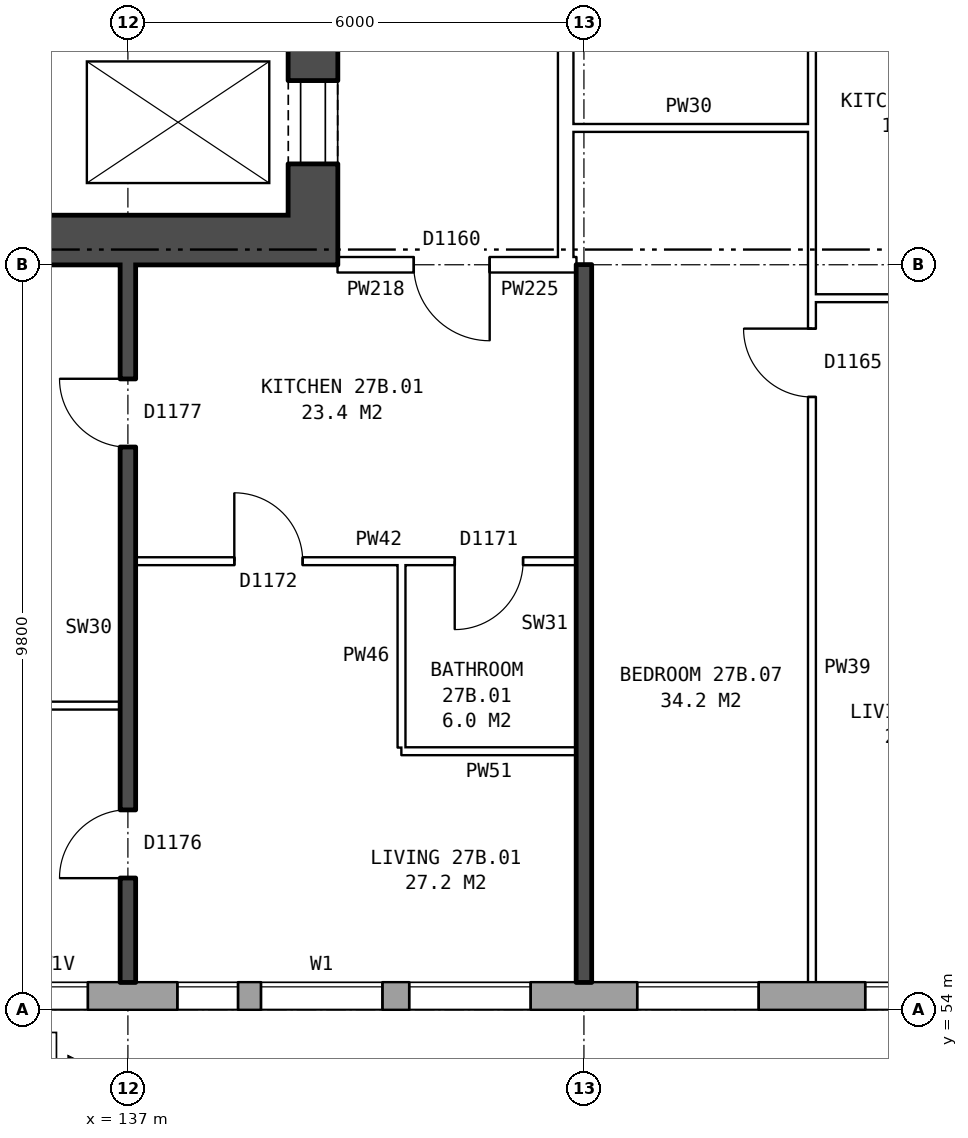
"""IFC4 building model, lengths in metres.
Left out: names, types, materials, properties, quantities, classifications, styles, units other than length and angle.
Written with IfcOpenShell. Run it as: python <this file> out.ifc"""

import sys

from ifc_helpers import new_model, si_unit, direction, frame, frame_2d, origin, place, context, subcontext, project, spatial, rectangle, extrude, element, fill, save


model = new_model("IFC4")
c1 = context("Model", 3, precision=1e-05, world=origin(), true_north=direction((0.0, 1.0)))
c2 = subcontext(c1, "Body", "Model", "MODEL_VIEW")
j1 = project(units=[si_unit("LENGTHUNIT", "METRE"), si_unit("PLANEANGLEUNIT", "RADIAN")], contexts=[c1])
p1 = place(None, origin())
s1 = spatial("IfcSite", under=j1, at=p1, CompositionType="ELEMENT")
p2 = place(p1, origin())
s2 = spatial("IfcBuilding", under=s1, at=p2, CompositionType="ELEMENT")
p3 = place(p2, frame((0.0, 0.0, 99.5)))
s3 = spatial("IfcBuildingStorey", under=s2, at=p3, CompositionType="ELEMENT", Elevation=99.5)
p4 = place(p3, frame((134.075, 54.18, 0.0), z_axis=(0.0, 0.0, 1.0), x_axis=(1.0, 0.0, 0.0)))
e1 = element("IfcWall", 1, at=p4, inside=s3, PredefinedType="STANDARD", context=c2, shape_type="SweptSolid", body=[
    extrude(rectangle(XDim=36.851, YDim=0.36, at=frame_2d((18.425, 0.0))), origin(), (0.0, 0.0, 1.0), 2.85),
])
p5 = place(p4, frame((0.3, 0.0, 0.8)))
e2 = element("IfcOpeningElement", 2, at=p5, cuts=e1, PredefinedType="OPENING", context=c2, shape_type="SweptSolid", body=[
    extrude(rectangle(XDim=1.0, YDim=1.8, at=frame_2d((0.5, 0.9))), frame((0.0, 0.19, 0.0), z_axis=(0.0, -1.0, 0.0), x_axis=(1.0, 0.0, 0.0)), (0.0, 0.0, 1.0), 0.38),
])
p6 = place(p4, frame((3.575, 0.0, 0.8)))
e3 = element("IfcOpeningElement", 3, at=p6, cuts=e1, PredefinedType="OPENING", context=c2, shape_type="SweptSolid", body=[
    extrude(rectangle(XDim=0.8, YDim=0.9, at=frame_2d((0.4, 0.45))), frame((0.0, 0.19, 0.0), z_axis=(0.0, -1.0, 0.0), x_axis=(1.0, 0.0, 0.0)), (0.0, 0.0, 1.0), 0.38),
])
p7 = place(p4, frame((6.625, 0.0, 0.8)))
e4 = element("IfcOpeningElement", 4, at=p7, cuts=e1, PredefinedType="OPENING", context=c2, shape_type="SweptSolid", body=[
    extrude(rectangle(XDim=1.6, YDim=1.8, at=frame_2d((0.8, 0.9))), frame((0.0, 0.19, 0.0), z_axis=(0.0, -1.0, 0.0), x_axis=(1.0, 0.0, 0.0)), (0.0, 0.0, 1.0), 0.38),
])
p8 = place(p4, frame((9.625, 0.0, 0.8)))
e5 = element("IfcOpeningElement", 5, at=p8, cuts=e1, PredefinedType="OPENING", context=c2, shape_type="SweptSolid", body=[
    extrude(rectangle(XDim=1.6, YDim=1.8, at=frame_2d((0.8, 0.9))), frame((0.0, 0.19, 0.0), z_axis=(0.0, -1.0, 0.0), x_axis=(1.0, 0.0, 0.0)), (0.0, 0.0, 1.0), 0.38),
])
p9 = place(p4, frame((12.625, 0.0, 0.8)))
e6 = element("IfcOpeningElement", 6, at=p9, cuts=e1, PredefinedType="OPENING", context=c2, shape_type="SweptSolid", body=[
    extrude(rectangle(XDim=1.6, YDim=1.8, at=frame_2d((0.8, 0.9))), frame((0.0, 0.19, 0.0), z_axis=(0.0, -1.0, 0.0), x_axis=(1.0, 0.0, 0.0)), (0.0, 0.0, 1.0), 0.38),
])
p10 = place(p4, frame((15.625, 0.0, 0.8)))
e7 = element("IfcOpeningElement", 7, at=p10, cuts=e1, PredefinedType="OPENING", context=c2, shape_type="SweptSolid", body=[
    extrude(rectangle(XDim=1.6, YDim=1.8, at=frame_2d((0.8, 0.9))), frame((0.0, 0.19, 0.0), z_axis=(0.0, -1.0, 0.0), x_axis=(1.0, 0.0, 0.0)), (0.0, 0.0, 1.0), 0.38),
])
p11 = place(p4, frame((18.625, 0.0, 0.8)))
e8 = element("IfcOpeningElement", 8, at=p11, cuts=e1, PredefinedType="OPENING", context=c2, shape_type="SweptSolid", body=[
    extrude(rectangle(XDim=1.6, YDim=1.8, at=frame_2d((0.8, 0.9))), frame((0.0, 0.19, 0.0), z_axis=(0.0, -1.0, 0.0), x_axis=(1.0, 0.0, 0.0)), (0.0, 0.0, 1.0), 0.38),
])
p12 = place(p4, frame((21.625, 0.0, 0.8)))
e9 = element("IfcOpeningElement", 9, at=p12, cuts=e1, PredefinedType="OPENING", context=c2, shape_type="SweptSolid", body=[
    extrude(rectangle(XDim=1.6, YDim=1.8, at=frame_2d((0.8, 0.9))), frame((0.0, 0.19, 0.0), z_axis=(0.0, -1.0, 0.0), x_axis=(1.0, 0.0, 0.0)), (0.0, 0.0, 1.0), 0.38),
])
p13 = place(p4, frame((24.625, 0.0, 0.8)))
e10 = element("IfcOpeningElement", 10, at=p13, cuts=e1, PredefinedType="OPENING", context=c2, shape_type="SweptSolid", body=[
    extrude(rectangle(XDim=1.6, YDim=1.8, at=frame_2d((0.8, 0.9))), frame((0.0, 0.19, 0.0), z_axis=(0.0, -1.0, 0.0), x_axis=(1.0, 0.0, 0.0)), (0.0, 0.0, 1.0), 0.38),
])
p14 = place(p4, frame((27.625, 0.0, 0.8)))
e11 = element("IfcOpeningElement", 11, at=p14, cuts=e1, PredefinedType="OPENING", context=c2, shape_type="SweptSolid", body=[
    extrude(rectangle(XDim=1.6, YDim=1.8, at=frame_2d((0.8, 0.9))), frame((0.0, 0.19, 0.0), z_axis=(0.0, -1.0, 0.0), x_axis=(1.0, 0.0, 0.0)), (0.0, 0.0, 1.0), 0.38),
])
p15 = place(p4, frame((30.625, 0.0, 0.8)))
e12 = element("IfcOpeningElement", 12, at=p15, cuts=e1, PredefinedType="OPENING", context=c2, shape_type="SweptSolid", body=[
    extrude(rectangle(XDim=1.6, YDim=1.8, at=frame_2d((0.8, 0.9))), frame((0.0, 0.19, 0.0), z_axis=(0.0, -1.0, 0.0), x_axis=(1.0, 0.0, 0.0)), (0.0, 0.0, 1.0), 0.38),
])
p16 = place(p4, frame((34.425, 0.0, 1.7)))
e13 = element("IfcOpeningElement", 13, at=p16, cuts=e1, PredefinedType="OPENING", context=c2, shape_type="SweptSolid", body=[
    extrude(rectangle(XDim=0.8, YDim=0.9, at=frame_2d((0.4, 0.45))), frame((0.0, 0.19, 0.0), z_axis=(0.0, -1.0, 0.0), x_axis=(1.0, 0.0, 0.0)), (0.0, 0.0, 1.0), 0.38),
])
p17 = place(p4, frame((1.6, 0.0, 1.7)))
e14 = element("IfcOpeningElement", 14, at=p17, cuts=e1, PredefinedType="OPENING", context=c2, shape_type="SweptSolid", body=[
    extrude(rectangle(XDim=0.8, YDim=0.9, at=frame_2d((0.4, 0.45))), frame((0.0, 0.19, 0.0), z_axis=(0.0, -1.0, 0.0), x_axis=(1.0, 0.0, 0.0)), (0.0, 0.0, 1.0), 0.38),
])
p18 = place(p4, frame((4.675, 0.0, 0.8)))
e15 = element("IfcOpeningElement", 15, at=p18, cuts=e1, PredefinedType="OPENING", context=c2, shape_type="SweptSolid", body=[
    extrude(rectangle(XDim=1.6, YDim=1.8, at=frame_2d((0.8, 0.9))), frame((0.0, 0.19, 0.0), z_axis=(0.0, -1.0, 0.0), x_axis=(1.0, 0.0, 0.0)), (0.0, 0.0, 1.0), 0.38),
])
p19 = place(p4, frame((35.525, 0.0, 0.8)))
e16 = element("IfcOpeningElement", 16, at=p19, cuts=e1, PredefinedType="OPENING", context=c2, shape_type="SweptSolid", body=[
    extrude(rectangle(XDim=1.0, YDim=1.8, at=frame_2d((0.5, 0.9))), frame((0.0, 0.19, 0.0), z_axis=(0.0, -1.0, 0.0), x_axis=(1.0, 0.0, 0.0)), (0.0, 0.0, 1.0), 0.38),
])
p20 = place(p3, frame((139.435, 64.45, 0.0), z_axis=(0.0, 0.0, 1.0), x_axis=(0.0, 1.0, 0.0)))
e17 = element("IfcWall", 17, at=p20, inside=s3, PredefinedType="SHEAR", context=c2, shape_type="SweptSolid", body=[
    extrude(rectangle(XDim=11.1, YDim=0.65, at=frame_2d((5.55, 0.0))), origin(), (0.0, 0.0, 1.0), 2.85),
])
p21 = place(p20, frame((0.675, 0.0, 0.0)))
e18 = element("IfcOpeningElement", 18, at=p21, cuts=e17, PredefinedType="OPENING", context=c2, shape_type="SweptSolid", body=[
    extrude(rectangle(XDim=1.1, YDim=2.1, at=frame_2d((0.55, 1.05))), frame((0.0, 0.335, 0.0), z_axis=(0.0, -1.0, 0.0), x_axis=(1.0, 0.0, 0.0)), (0.0, 0.0, 1.0), 0.67),
])
p22 = place(p20, frame((9.25, 0.0, 0.0)))
e19 = element("IfcOpeningElement", 19, at=p22, cuts=e17, PredefinedType="OPENING", context=c2, shape_type="SweptSolid", body=[
    extrude(rectangle(XDim=1.1, YDim=2.1, at=frame_2d((0.55, 1.05))), frame((0.0, 0.335, 0.0), z_axis=(0.0, -1.0, 0.0), x_axis=(1.0, 0.0, 0.0)), (0.0, 0.0, 1.0), 0.67),
])
p23 = place(p20, frame((7.475, 0.0, 0.0)))
e20 = element("IfcOpeningElement", 20, at=p23, cuts=e17, PredefinedType="OPENING", context=c2, shape_type="SweptSolid", body=[
    extrude(rectangle(XDim=0.85, YDim=2.1, at=frame_2d((0.425, 1.05))), frame((0.0, 0.335, 0.0), z_axis=(0.0, -1.0, 0.0), x_axis=(1.0, 0.0, 0.0)), (0.0, 0.0, 1.0), 0.67),
])
p24 = place(p3, frame((139.76, 64.125, 0.0), z_axis=(0.0, 0.0, 1.0), x_axis=(-1.0, 0.0, 0.0)))
e21 = element("IfcWall", 21, at=p24, inside=s3, PredefinedType="SHEAR", context=c2, shape_type="SweptSolid", body=[
    extrude(rectangle(XDim=8.4, YDim=0.65, at=frame_2d((4.2, 0.0))), origin(), (0.0, 0.0, 1.0), 2.85),
])
p25 = place(p3, frame((142.76, 63.9, 0.0), z_axis=(0.0, 0.0, 1.0), x_axis=(0.0, 1.0, 0.0)))
e22 = element("IfcWall", 22, at=p25, inside=s3, PredefinedType="PARTITIONING", context=c2, shape_type="SweptSolid", body=[
    extrude(rectangle(XDim=12.2, YDim=0.2, at=frame_2d((6.1, 0.0))), origin(), (0.0, 0.0, 1.0), 2.85),
])
p26 = place(p25, frame((5.1, 0.0, 0.0)))
e23 = element("IfcOpeningElement", 23, at=p26, cuts=e22, PredefinedType="OPENING", context=c2, shape_type="SweptSolid", body=[
    extrude(rectangle(XDim=2.0, YDim=2.1, at=frame_2d((1.0, 1.05))), frame((0.0, 0.11, 0.0), z_axis=(0.0, -1.0, 0.0), x_axis=(1.0, 0.0, 0.0)), (0.0, 0.0, 1.0), 0.22),
])
p27 = place(p3, frame((140.6, 57.4, 0.0), z_axis=(0.0, 0.0, 1.0), x_axis=(1.0, 0.0, 0.0)))
e24 = element("IfcWall", 24, at=p27, inside=s3, PredefinedType="PARTITIONING", context=c2, shape_type="SweptSolid", body=[
    extrude(rectangle(XDim=2.3, YDim=0.1, at=frame_2d((1.15, 0.0))), origin(), (0.0, 0.0, 1.0), 2.85),
])
p28 = place(p3, frame((131.36, 58.0, 0.0), z_axis=(0.0, 0.0, 1.0), x_axis=(1.0, 0.0, 0.0)))
e25 = element("IfcWall", 25, at=p28, inside=s3, PredefinedType="PARTITIONING", context=c2, shape_type="SweptSolid", body=[
    extrude(rectangle(XDim=5.54, YDim=0.1, at=frame_2d((2.77, 0.0))), origin(), (0.0, 0.0, 1.0), 2.85),
])
p29 = place(p3, frame((137.1, 59.9, 0.0), z_axis=(0.0, 0.0, 1.0), x_axis=(1.0, 0.0, 0.0)))
e26 = element("IfcWall", 26, at=p29, inside=s3, PredefinedType="PARTITIONING", context=c2, shape_type="SweptSolid", body=[
    extrude(rectangle(XDim=5.8, YDim=0.1, at=frame_2d((2.9, 0.0))), origin(), (0.0, 0.0, 1.0), 2.85),
])
p30 = place(p29, frame((1.3, 0.0, 0.0)))
e27 = element("IfcOpeningElement", 27, at=p30, cuts=e26, PredefinedType="OPENING", context=c2, shape_type="SweptSolid", body=[
    extrude(rectangle(XDim=0.9, YDim=2.1, at=frame_2d((0.45, 1.05))), frame((0.0, 0.06, 0.0), z_axis=(0.0, -1.0, 0.0), x_axis=(1.0, 0.0, 0.0)), (0.0, 0.0, 1.0), 0.12),
])
p31 = place(p29, frame((4.2, 0.0, 0.0)))
e28 = element("IfcOpeningElement", 28, at=p31, cuts=e26, PredefinedType="OPENING", context=c2, shape_type="SweptSolid", body=[
    extrude(rectangle(XDim=0.9, YDim=2.1, at=frame_2d((0.45, 1.05))), frame((0.0, 0.06, 0.0), z_axis=(0.0, -1.0, 0.0), x_axis=(1.0, 0.0, 0.0)), (0.0, 0.0, 1.0), 0.12),
])
p32 = place(p3, frame((146.0, 63.36, 0.0), z_axis=(0.0, 0.0, 1.0), x_axis=(1.0, 0.0, 0.0)))
e29 = element("IfcWall", 29, at=p32, inside=s3, PredefinedType="PARTITIONING", context=c2, shape_type="SweptSolid", body=[
    extrude(rectangle(XDim=6.0, YDim=0.1, at=frame_2d((3.0, 0.0))), origin(), (0.0, 0.0, 1.0), 2.85),
])
p33 = place(p32, frame((1.05, 0.0, 0.0)))
e30 = element("IfcOpeningElement", 30, at=p33, cuts=e29, PredefinedType="OPENING", context=c2, shape_type="SweptSolid", body=[
    extrude(rectangle(XDim=0.9, YDim=2.1, at=frame_2d((0.45, 1.05))), frame((0.0, 0.06, 0.0), z_axis=(0.0, -1.0, 0.0), x_axis=(1.0, 0.0, 0.0)), (0.0, 0.0, 1.0), 0.12),
])
p34 = place(p32, frame((4.05, 0.0, 0.0)))
e31 = element("IfcOpeningElement", 31, at=p34, cuts=e29, PredefinedType="OPENING", context=c2, shape_type="SweptSolid", body=[
    extrude(rectangle(XDim=0.9, YDim=2.1, at=frame_2d((0.45, 1.05))), frame((0.0, 0.06, 0.0), z_axis=(0.0, -1.0, 0.0), x_axis=(1.0, 0.0, 0.0)), (0.0, 0.0, 1.0), 0.12),
])
p35 = place(p3, frame((139.76, 63.8, 0.0), z_axis=(0.0, 0.0, 1.0), x_axis=(1.0, 0.0, 0.0)))
e32 = element("IfcWall", 32, at=p35, inside=s3, PredefinedType="PARTITIONING", context=c2, shape_type="SweptSolid", body=[
    extrude(rectangle(XDim=3.0, YDim=0.2, at=frame_2d((1.5, 0.0))), origin(), (0.0, 0.0, 1.0), 2.85),
])
p36 = place(p35, frame((1.0, 0.0, 0.0)))
e33 = element("IfcOpeningElement", 33, at=p36, cuts=e32, PredefinedType="OPENING", context=c2, shape_type="SweptSolid", body=[
    extrude(rectangle(XDim=1.0, YDim=2.1, at=frame_2d((0.5, 1.05))), frame((0.0, 0.11, 0.0), z_axis=(0.0, -1.0, 0.0), x_axis=(1.0, 0.0, 0.0)), (0.0, 0.0, 1.0), 0.22),
])
p37 = place(p3, frame((142.76, 63.8, 0.0), z_axis=(0.0, 0.0, 1.0), x_axis=(1.0, 0.0, 0.0)))
e34 = element("IfcWall", 34, at=p37, inside=s3, PredefinedType="PARTITIONING", context=c2, shape_type="SweptSolid", body=[
    extrude(rectangle(XDim=0.14, YDim=0.2, at=frame_2d((0.07, 0.0))), origin(), (0.0, 0.0, 1.0), 2.85),
])
p38 = place(p3, frame((142.76, 65.6, 0.0), z_axis=(0.0, 0.0, 1.0), x_axis=(1.0, 0.0, 0.0)))
e35 = element("IfcWall", 35, at=p38, inside=s3, PredefinedType="PARTITIONING", context=c2, shape_type="SweptSolid", body=[
    extrude(rectangle(XDim=3.24, YDim=0.1, at=frame_2d((1.62, 0.0))), origin(), (0.0, 0.0, 1.0), 2.85),
])
p39 = place(p3, frame((137.0, 54.36, 0.0), z_axis=(0.0, 0.0, 1.0), x_axis=(0.0, 1.0, 0.0)))
e36 = element("IfcWall", 36, at=p39, inside=s3, PredefinedType="SOLIDWALL", context=c2, shape_type="SweptSolid", body=[
    extrude(rectangle(XDim=9.44, YDim=0.2, at=frame_2d((4.72, 0.0))), origin(), (0.0, 0.0, 1.0), 2.85),
])
p40 = place(p39, frame((1.37, 0.0, 0.0)))
e37 = element("IfcOpeningElement", 37, at=p40, cuts=e36, PredefinedType="OPENING", context=c2, shape_type="SweptSolid", body=[
    extrude(rectangle(XDim=0.9, YDim=2.1, at=frame_2d((0.45, 1.05))), frame((0.0, 0.11, 0.0), z_axis=(0.0, -1.0, 0.0), x_axis=(1.0, 0.0, 0.0)), (0.0, 0.0, 1.0), 0.22),
])
p41 = place(p39, frame((7.04, 0.0, 0.0)))
e38 = element("IfcOpeningElement", 38, at=p41, cuts=e36, PredefinedType="OPENING", context=c2, shape_type="SweptSolid", body=[
    extrude(rectangle(XDim=0.9, YDim=2.1, at=frame_2d((0.45, 1.05))), frame((0.0, 0.11, 0.0), z_axis=(0.0, -1.0, 0.0), x_axis=(1.0, 0.0, 0.0)), (0.0, 0.0, 1.0), 0.22),
])
p42 = place(p3, frame((140.6, 57.45, 0.0), z_axis=(0.0, 0.0, 1.0), x_axis=(0.0, 1.0, 0.0)))
e39 = element("IfcWall", 39, at=p42, inside=s3, PredefinedType="PARTITIONING", context=c2, shape_type="SweptSolid", body=[
    extrude(rectangle(XDim=2.4, YDim=0.1, at=frame_2d((1.2, 0.0))), origin(), (0.0, 0.0, 1.0), 2.85),
])
p43 = place(p3, frame((143.0, 54.36, 0.0), z_axis=(0.0, 0.0, 1.0), x_axis=(0.0, 1.0, 0.0)))
e40 = element("IfcWall", 40, at=p43, inside=s3, PredefinedType="SOLIDWALL", context=c2, shape_type="SweptSolid", body=[
    extrude(rectangle(XDim=9.44, YDim=0.2, at=frame_2d((4.72, 0.0))), origin(), (0.0, 0.0, 1.0), 2.85),
])
p44 = place(p3, frame((146.0, 54.36, 0.0), z_axis=(0.0, 0.0, 1.0), x_axis=(0.0, 1.0, 0.0)))
e41 = element("IfcWall", 41, at=p44, inside=s3, PredefinedType="PARTITIONING", context=c2, shape_type="SweptSolid", body=[
    extrude(rectangle(XDim=14.34, YDim=0.1, at=frame_2d((7.17, 0.0))), origin(), (0.0, 0.0, 1.0), 2.85),
])
p45 = place(p44, frame((7.7, 0.0, 0.0)))
e42 = element("IfcOpeningElement", 42, at=p45, cuts=e41, PredefinedType="OPENING", context=c2, shape_type="SweptSolid", body=[
    extrude(rectangle(XDim=0.9, YDim=2.1, at=frame_2d((0.45, 1.05))), frame((0.0, 0.06, 0.0), z_axis=(0.0, -1.0, 0.0), x_axis=(1.0, 0.0, 0.0)), (0.0, 0.0, 1.0), 0.12),
])
p46 = place(p44, frame((13.04, 0.0, 0.0)))
e43 = element("IfcOpeningElement", 43, at=p46, cuts=e41, PredefinedType="OPENING", context=c2, shape_type="SweptSolid", body=[
    extrude(rectangle(XDim=0.9, YDim=2.1, at=frame_2d((0.45, 1.05))), frame((0.0, 0.06, 0.0), z_axis=(0.0, -1.0, 0.0), x_axis=(1.0, 0.0, 0.0)), (0.0, 0.0, 1.0), 0.12),
])
p47 = place(p6, origin())
e44 = element("IfcWindow", 44, at=p47, inside=s3, PartitioningType="SINGLE_PANEL", PredefinedType="WINDOW", context=c2, shape_type="SweptSolid", body=[
    extrude(rectangle(XDim=0.8, YDim=0.9, at=frame_2d((0.4, 0.45))), frame((0.0, 0.15, 0.0), z_axis=(0.0, -1.0, 0.0), x_axis=(1.0, 0.0, 0.0)), (0.0, 0.0, 1.0), 0.06),
])
fill(e3, e44)
p48 = place(p7, origin())
e45 = element("IfcWindow", 45, at=p48, inside=s3, PartitioningType="SINGLE_PANEL", PredefinedType="WINDOW", context=c2, shape_type="SweptSolid", body=[
    extrude(rectangle(XDim=1.6, YDim=1.8, at=frame_2d((0.8, 0.9))), frame((0.0, 0.15, 0.0), z_axis=(0.0, -1.0, 0.0), x_axis=(1.0, 0.0, 0.0)), (0.0, 0.0, 1.0), 0.06),
])
fill(e4, e45)
p49 = place(p8, origin())
e46 = element("IfcWindow", 46, at=p49, inside=s3, PartitioningType="SINGLE_PANEL", PredefinedType="WINDOW", context=c2, shape_type="SweptSolid", body=[
    extrude(rectangle(XDim=1.6, YDim=1.8, at=frame_2d((0.8, 0.9))), frame((0.0, 0.15, 0.0), z_axis=(0.0, -1.0, 0.0), x_axis=(1.0, 0.0, 0.0)), (0.0, 0.0, 1.0), 0.06),
])
fill(e5, e46)
p50 = place(p9, origin())
e47 = element("IfcWindow", 47, at=p50, inside=s3, PartitioningType="SINGLE_PANEL", PredefinedType="WINDOW", context=c2, shape_type="SweptSolid", body=[
    extrude(rectangle(XDim=1.6, YDim=1.8, at=frame_2d((0.8, 0.9))), frame((0.0, 0.15, 0.0), z_axis=(0.0, -1.0, 0.0), x_axis=(1.0, 0.0, 0.0)), (0.0, 0.0, 1.0), 0.06),
])
fill(e6, e47)
p51 = place(p21, origin())
e48 = element("IfcDoor", 48, at=p51, inside=s3, OperationType="DOUBLE_DOOR_SLIDING", PredefinedType="DOOR", context=c2, shape_type="SweptSolid", body=[
    extrude(rectangle(XDim=1.1, YDim=2.1, at=frame_2d((0.55, 1.05))), frame((0.0, 0.31, 0.0), z_axis=(0.0, -1.0, 0.0), x_axis=(1.0, 0.0, 0.0)), (0.0, 0.0, 1.0), 0.05),
])
fill(e18, e48)
p52 = place(p40, origin())
e49 = element("IfcDoor", 49, at=p52, inside=s3, OperationType="SINGLE_SWING_LEFT", PredefinedType="DOOR", context=c2, shape_type="SweptSolid", body=[
    extrude(rectangle(XDim=0.9, YDim=2.1, at=frame_2d((0.45, 1.05))), frame((0.0, 0.025, 0.0), z_axis=(0.0, -1.0, 0.0), x_axis=(1.0, 0.0, 0.0)), (0.0, 0.0, 1.0), 0.05),
])
fill(e37, e49)
p53 = place(p41, origin())
e50 = element("IfcDoor", 50, at=p53, inside=s3, OperationType="SINGLE_SWING_RIGHT", PredefinedType="DOOR", context=c2, shape_type="SweptSolid", body=[
    extrude(rectangle(XDim=0.9, YDim=2.1, at=frame_2d((0.45, 1.05))), frame((0.0, 0.025, 0.0), z_axis=(0.0, -1.0, 0.0), x_axis=(1.0, 0.0, 0.0)), (0.0, 0.0, 1.0), 0.05),
])
fill(e38, e50)
p54 = place(p36, frame((1.0, 0.0, 0.0), z_axis=(0.0, 0.0, 1.0), x_axis=(-1.0, 0.0, 0.0)))
e51 = element("IfcDoor", 51, at=p54, inside=s3, OperationType="SINGLE_SWING_LEFT", PredefinedType="DOOR", context=c2, shape_type="SweptSolid", body=[
    extrude(rectangle(XDim=1.0, YDim=2.1, at=frame_2d((0.5, 1.05))), frame((0.0, 0.025, 0.0), z_axis=(0.0, -1.0, 0.0), x_axis=(1.0, 0.0, 0.0)), (0.0, 0.0, 1.0), 0.05),
])
fill(e33, e51)
p55 = place(p30, origin())
e52 = element("IfcDoor", 52, at=p55, inside=s3, OperationType="SINGLE_SWING_LEFT", PredefinedType="DOOR", context=c2, shape_type="SweptSolid", body=[
    extrude(rectangle(XDim=0.9, YDim=2.1, at=frame_2d((0.45, 1.05))), frame((0.0, 0.025, 0.0), z_axis=(0.0, -1.0, 0.0), x_axis=(1.0, 0.0, 0.0)), (0.0, 0.0, 1.0), 0.05),
])
fill(e27, e52)
p56 = place(p31, frame((0.9, 0.0, 0.0), z_axis=(0.0, 0.0, 1.0), x_axis=(-1.0, 0.0, 0.0)))
e53 = element("IfcDoor", 53, at=p56, inside=s3, OperationType="SINGLE_SWING_RIGHT", PredefinedType="DOOR", context=c2, shape_type="SweptSolid", body=[
    extrude(rectangle(XDim=0.9, YDim=2.1, at=frame_2d((0.45, 1.05))), frame((0.0, 0.025, 0.0), z_axis=(0.0, -1.0, 0.0), x_axis=(1.0, 0.0, 0.0)), (0.0, 0.0, 1.0), 0.05),
])
fill(e28, e53)
p57 = place(p45, origin())
e54 = element("IfcDoor", 54, at=p57, inside=s3, OperationType="SINGLE_SWING_RIGHT", PredefinedType="DOOR", context=c2, shape_type="SweptSolid", body=[
    extrude(rectangle(XDim=0.9, YDim=2.1, at=frame_2d((0.45, 1.05))), frame((0.0, 0.025, 0.0), z_axis=(0.0, -1.0, 0.0), x_axis=(1.0, 0.0, 0.0)), (0.0, 0.0, 1.0), 0.05),
])
fill(e42, e54)
p58 = place(p17, origin())
e55 = element("IfcWindow", 55, at=p58, inside=s3, PartitioningType="SINGLE_PANEL", PredefinedType="WINDOW", context=c2, shape_type="SweptSolid", body=[
    extrude(rectangle(XDim=0.8, YDim=0.9, at=frame_2d((0.4, 0.45))), frame((0.0, 0.15, 0.0), z_axis=(0.0, -1.0, 0.0), x_axis=(1.0, 0.0, 0.0)), (0.0, 0.0, 1.0), 0.06),
])
fill(e14, e55)
p59 = place(p18, origin())
e56 = element("IfcWindow", 56, at=p59, inside=s3, PartitioningType="SINGLE_PANEL", PredefinedType="WINDOW", context=c2, shape_type="SweptSolid", body=[
    extrude(rectangle(XDim=1.6, YDim=1.8, at=frame_2d((0.8, 0.9))), frame((0.0, 0.15, 0.0), z_axis=(0.0, -1.0, 0.0), x_axis=(1.0, 0.0, 0.0)), (0.0, 0.0, 1.0), 0.06),
])
fill(e15, e56)
save(model, sys.argv[1])
